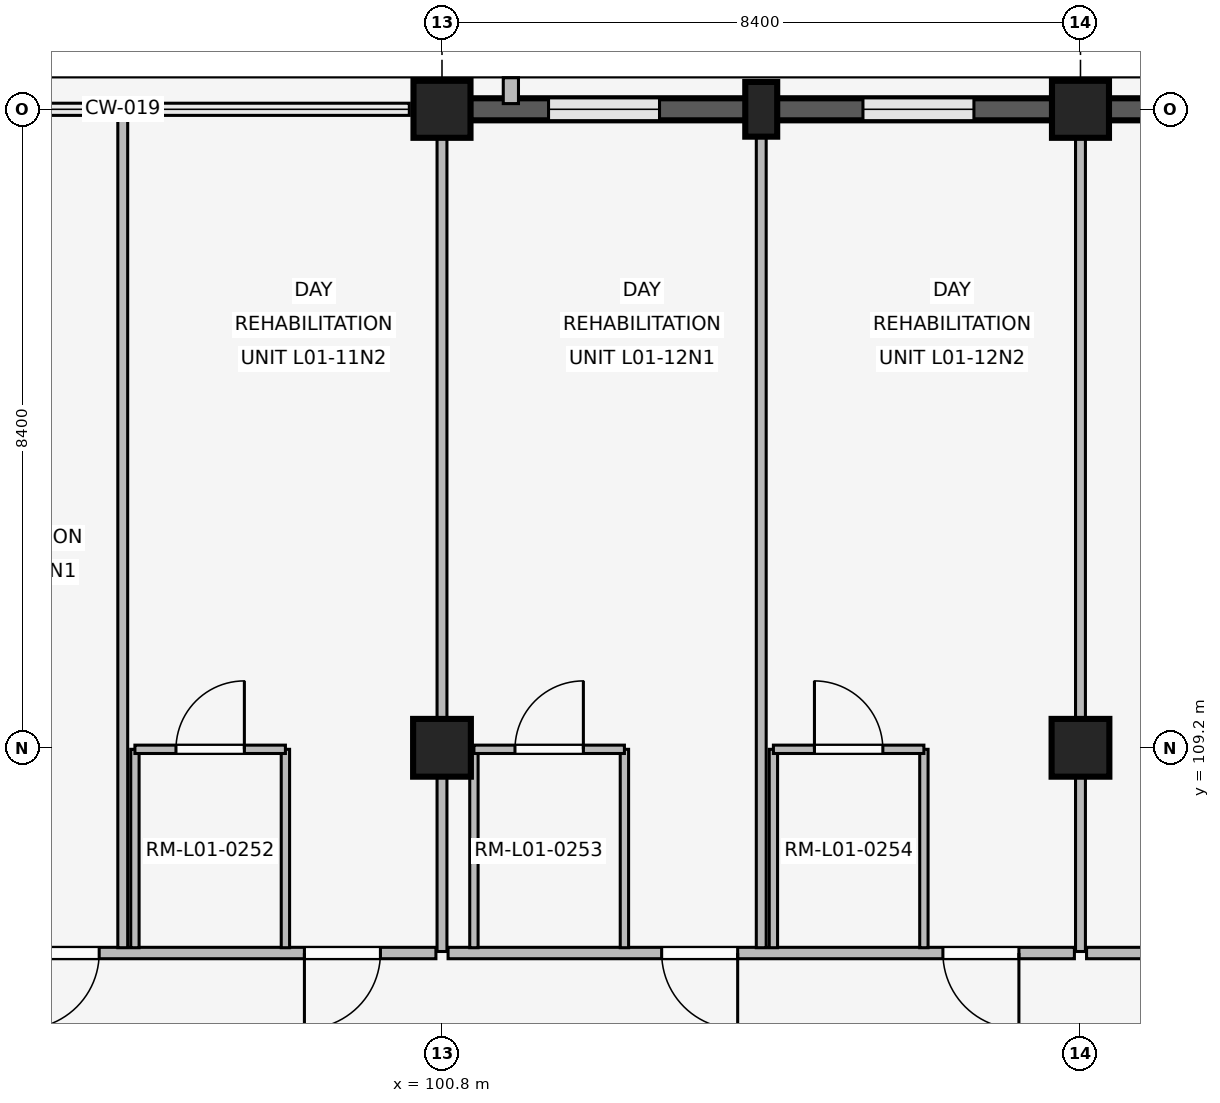
"""IFC4 building model, lengths in metres.
Left out: names, types, materials, properties, quantities, classifications, styles, units other than length and angle.
Written with IfcOpenShell. Run it as: python <this file> out.ifc"""

import sys

from ifc_helpers import new_model, si_unit, direction, frame, frame_2d, origin, origin_2d, place, context, subcontext, project, spatial, rectangle, extrude, element, fill, save


model = new_model("IFC4")
c1 = context("Model", 3, precision=1e-05, world=origin(), true_north=direction((0.0, 1.0)))
c2 = subcontext(c1, "Body", "Model", "MODEL_VIEW")
j1 = project(units=[si_unit("LENGTHUNIT", "METRE"), si_unit("PLANEANGLEUNIT", "RADIAN")], contexts=[c1])
p1 = place(None, origin())
s1 = spatial("IfcSite", under=j1, at=p1, CompositionType="ELEMENT")
p2 = place(p1, origin())
s2 = spatial("IfcBuilding", under=s1, at=p2, CompositionType="ELEMENT")
p3 = place(p2, frame((0.0, 0.0, 4.8)))
s3 = spatial("IfcBuildingStorey", under=s2, at=p3, CompositionType="ELEMENT", Elevation=4.8)
p4 = place(p3, frame((100.8, 109.2, 0.0), z_axis=(0.0, 0.0, 1.0), x_axis=(1.0, 0.0, 0.0)))
e1 = element("IfcColumn", 1, at=p4, inside=s3, PredefinedType="COLUMN", context=c2, shape_type="SweptSolid", body=[
    extrude(rectangle(XDim=0.76, YDim=0.76, at=origin_2d()), origin(), (0.0, 0.0, 1.0), 3.3),
])
p5 = place(p3, frame((100.8, 117.6, 0.0), z_axis=(0.0, 0.0, 1.0), x_axis=(1.0, 0.0, 0.0)))
e2 = element("IfcColumn", 2, at=p5, inside=s3, PredefinedType="COLUMN", context=c2, shape_type="SweptSolid", body=[
    extrude(rectangle(XDim=0.75, YDim=0.75, at=origin_2d()), origin(), (0.0, 0.0, 1.0), 3.3),
])
p6 = place(p3, frame((109.2, 109.2, 0.0), z_axis=(0.0, 0.0, 1.0), x_axis=(1.0, 0.0, 0.0)))
e3 = element("IfcColumn", 3, at=p6, inside=s3, PredefinedType="COLUMN", context=c2, shape_type="SweptSolid", body=[
    extrude(rectangle(XDim=0.76, YDim=0.76, at=origin_2d()), origin(), (0.0, 0.0, 1.0), 3.3),
])
p7 = place(p3, frame((109.2, 117.6, 0.0), z_axis=(0.0, 0.0, 1.0), x_axis=(1.0, 0.0, 0.0)))
e4 = element("IfcColumn", 4, at=p7, inside=s3, PredefinedType="COLUMN", context=c2, shape_type="SweptSolid", body=[
    extrude(rectangle(XDim=0.75, YDim=0.75, at=origin_2d()), origin(), (0.0, 0.0, 1.0), 3.3),
])
p8 = place(p3, frame((105.0, 117.6, 0.0), z_axis=(0.0, 0.0, 1.0), x_axis=(1.0, 0.0, 0.0)))
e5 = element("IfcColumn", 5, at=p8, inside=s3, PredefinedType="PILASTER", context=c2, shape_type="SweptSolid", body=[
    extrude(rectangle(XDim=0.42, YDim=0.72, at=origin_2d()), origin(), (0.0, 0.0, 1.0), 3.3),
])
p9 = place(p3, frame((101.17, 117.6, 0.0), z_axis=(0.0, 0.0, 1.0), x_axis=(1.0, 0.0, 0.0)))
e6 = element("IfcWall", 6, at=p9, inside=s3, PredefinedType="SOLIDWALL", context=c2, shape_type="SweptSolid", body=[
    extrude(rectangle(XDim=7.66, YDim=0.29, at=frame_2d((3.83, 0.0))), origin(), (0.0, 0.0, 1.0), 2.42),
])
p10 = place(p9, frame((1.032, 0.0, 0.85)))
e7 = element("IfcOpeningElement", 7, at=p10, cuts=e6, PredefinedType="OPENING", context=c2, shape_type="SweptSolid", body=[
    extrude(rectangle(XDim=1.46, YDim=0.85, at=frame_2d((0.73, 0.425))), frame((0.0, 0.155, 0.0), z_axis=(0.0, -1.0, 0.0), x_axis=(1.0, 0.0, 0.0)), (0.0, 0.0, 1.0), 0.31),
])
p11 = place(p9, frame((5.168, 0.0, 0.85)))
e8 = element("IfcOpeningElement", 8, at=p11, cuts=e6, PredefinedType="OPENING", context=c2, shape_type="SweptSolid", body=[
    extrude(rectangle(XDim=1.46, YDim=0.85, at=frame_2d((0.73, 0.425))), frame((0.0, 0.155, 0.0), z_axis=(0.0, -1.0, 0.0), x_axis=(1.0, 0.0, 0.0)), (0.0, 0.0, 1.0), 0.31),
])
p12 = place(p3, frame((101.706, 117.675, 0.0), z_axis=(0.0, 0.0, 1.0), x_axis=(0.0, 1.0, 0.0)))
e9 = element("IfcWall", 9, at=p12, inside=s3, PredefinedType="ELEMENTEDWALL", context=c2, shape_type="SweptSolid", body=[
    extrude(rectangle(XDim=0.34, YDim=0.2, at=frame_2d((0.17, 0.0))), origin(), (0.0, 0.0, 1.0), 2.4),
])
p13 = place(p3, frame((109.57, 117.6, 0.0), z_axis=(0.0, 0.0, 1.0), x_axis=(1.0, 0.0, 0.0)))
e10 = element("IfcWall", 10, at=p13, inside=s3, PredefinedType="SOLIDWALL", context=c2, shape_type="SweptSolid", body=[
    extrude(rectangle(XDim=7.66, YDim=0.29, at=frame_2d((3.83, 0.0))), origin(), (0.0, 0.0, 1.0), 2.42),
])
p14 = place(p13, frame((0.952, 0.0, 0.85)))
e11 = element("IfcOpeningElement", 11, at=p14, cuts=e10, PredefinedType="OPENING", context=c2, shape_type="SweptSolid", body=[
    extrude(rectangle(XDim=1.62, YDim=0.95, at=frame_2d((0.81, 0.475))), frame((0.0, 0.155, 0.0), z_axis=(0.0, -1.0, 0.0), x_axis=(1.0, 0.0, 0.0)), (0.0, 0.0, 1.0), 0.31),
])
p15 = place(p13, frame((5.088, 0.0, 0.85)))
e12 = element("IfcOpeningElement", 12, at=p15, cuts=e10, PredefinedType="OPENING", context=c2, shape_type="SweptSolid", body=[
    extrude(rectangle(XDim=1.62, YDim=0.95, at=frame_2d((0.81, 0.475))), frame((0.0, 0.155, 0.0), z_axis=(0.0, -1.0, 0.0), x_axis=(1.0, 0.0, 0.0)), (0.0, 0.0, 1.0), 0.31),
])
p16 = place(p3, frame((100.72, 106.5, 0.0), z_axis=(0.0, 0.0, 1.0), x_axis=(-1.0, 0.0, 0.0)))
e13 = element("IfcWall", 13, at=p16, inside=s3, PredefinedType="PARTITIONING", context=c2, shape_type="SweptSolid", body=[
    extrude(rectangle(XDim=7.96, YDim=0.15, at=frame_2d((3.98, 0.0))), origin(), (0.0, 0.0, 1.0), 2.4),
])
p17 = place(p16, frame((0.73, 0.0, 0.0)))
e14 = element("IfcOpeningElement", 14, at=p17, cuts=e13, PredefinedType="OPENING", context=c2, shape_type="SweptSolid", body=[
    extrude(rectangle(XDim=1.0, YDim=2.15, at=frame_2d((0.5, 1.075))), frame((0.0, 0.085, 0.0), z_axis=(0.0, -1.0, 0.0), x_axis=(1.0, 0.0, 0.0)), (0.0, 0.0, 1.0), 0.17),
])
p18 = place(p16, frame((4.43, 0.0, 0.0)))
e15 = element("IfcOpeningElement", 15, at=p18, cuts=e13, PredefinedType="OPENING", context=c2, shape_type="SweptSolid", body=[
    extrude(rectangle(XDim=1.0, YDim=2.15, at=frame_2d((0.5, 1.075))), frame((0.0, 0.085, 0.0), z_axis=(0.0, -1.0, 0.0), x_axis=(1.0, 0.0, 0.0)), (0.0, 0.0, 1.0), 0.17),
])
p19 = place(p3, frame((96.6, 106.57, 0.0), z_axis=(0.0, 0.0, 1.0), x_axis=(0.0, 1.0, 0.0)))
e16 = element("IfcWall", 16, at=p19, inside=s3, PredefinedType="PARTITIONING", context=c2, shape_type="SweptSolid", body=[
    extrude(rectangle(XDim=10.93, YDim=0.13, at=frame_2d((5.465, 0.0))), origin(), (0.0, 0.0, 1.0), 2.4),
])
for number, where, z_axis, x_axis in (
    (17, (96.76, 106.57, 0.0), (0.0, 0.0, 1.0), (0.0, 1.0, 0.0)),
    (18, (98.74, 106.57, 0.0), (0.0, 0.0, 1.0), (0.0, 1.0, 0.0)),
):
    element("IfcWall", number, at=place(p3, frame(where, z_axis=z_axis, x_axis=x_axis)), inside=s3, PredefinedType="PARTITIONING", context=c2, shape_type="SweptSolid", body=[
        extrude(rectangle(XDim=2.61, YDim=0.11, at=frame_2d((1.305, 0.0))), origin(), (0.0, 0.0, 1.0), 2.4),
    ])
p20 = place(p3, frame((96.76, 109.18, 0.0), z_axis=(0.0, 0.0, 1.0), x_axis=(1.0, 0.0, 0.0)))
e19 = element("IfcWall", 19, at=p20, inside=s3, PredefinedType="PARTITIONING", context=c2, shape_type="SweptSolid", body=[
    extrude(rectangle(XDim=1.98, YDim=0.11, at=frame_2d((0.99, 0.0))), origin(), (0.0, 0.0, 1.0), 2.4),
])
p21 = place(p20, frame((0.54, 0.0, 0.0)))
e20 = element("IfcOpeningElement", 20, at=p21, cuts=e19, PredefinedType="OPENING", context=c2, shape_type="SweptSolid", body=[
    extrude(rectangle(XDim=0.9, YDim=2.1, at=frame_2d((0.45, 1.05))), frame((0.0, 0.065, 0.0), z_axis=(0.0, -1.0, 0.0), x_axis=(1.0, 0.0, 0.0)), (0.0, 0.0, 1.0), 0.13),
])
p22 = place(p3, frame((100.8, 106.52, 0.0), z_axis=(0.0, 0.0, 1.0), x_axis=(0.0, 1.0, 0.0)))
e21 = element("IfcWall", 21, at=p22, inside=s3, PredefinedType="PARTITIONING", context=c2, shape_type="SweptSolid", body=[
    extrude(rectangle(XDim=10.94, YDim=0.13, at=frame_2d((5.47, 0.0))), origin(), (0.0, 0.0, 1.0), 2.4),
])
p23 = place(p3, frame((109.12, 106.5, 0.0), z_axis=(0.0, 0.0, 1.0), x_axis=(-1.0, 0.0, 0.0)))
e22 = element("IfcWall", 22, at=p23, inside=s3, PredefinedType="PARTITIONING", context=c2, shape_type="SweptSolid", body=[
    extrude(rectangle(XDim=8.24, YDim=0.15, at=frame_2d((4.12, 0.0))), origin(), (0.0, 0.0, 1.0), 2.4),
])
p24 = place(p23, frame((0.73, 0.0, 0.0)))
e23 = element("IfcOpeningElement", 23, at=p24, cuts=e22, PredefinedType="OPENING", context=c2, shape_type="SweptSolid", body=[
    extrude(rectangle(XDim=1.0, YDim=2.15, at=frame_2d((0.5, 1.075))), frame((0.0, 0.085, 0.0), z_axis=(0.0, -1.0, 0.0), x_axis=(1.0, 0.0, 0.0)), (0.0, 0.0, 1.0), 0.17),
])
p25 = place(p23, frame((4.43, 0.0, 0.0)))
e24 = element("IfcOpeningElement", 24, at=p25, cuts=e22, PredefinedType="OPENING", context=c2, shape_type="SweptSolid", body=[
    extrude(rectangle(XDim=1.0, YDim=2.15, at=frame_2d((0.5, 1.075))), frame((0.0, 0.085, 0.0), z_axis=(0.0, -1.0, 0.0), x_axis=(1.0, 0.0, 0.0)), (0.0, 0.0, 1.0), 0.17),
])
p26 = place(p3, frame((105.0, 106.57, 0.0), z_axis=(0.0, 0.0, 1.0), x_axis=(0.0, 1.0, 0.0)))
e25 = element("IfcWall", 25, at=p26, inside=s3, PredefinedType="PARTITIONING", context=c2, shape_type="SweptSolid", body=[
    extrude(rectangle(XDim=10.93, YDim=0.13, at=frame_2d((5.465, 0.0))), origin(), (0.0, 0.0, 1.0), 2.4),
])
for number, where, z_axis, x_axis in (
    (26, (101.22, 106.57, 0.0), (0.0, 0.0, 1.0), (0.0, 1.0, 0.0)),
    (27, (103.2, 106.57, 0.0), (0.0, 0.0, 1.0), (0.0, 1.0, 0.0)),
):
    element("IfcWall", number, at=place(p3, frame(where, z_axis=z_axis, x_axis=x_axis)), inside=s3, PredefinedType="PARTITIONING", context=c2, shape_type="SweptSolid", body=[
        extrude(rectangle(XDim=2.61, YDim=0.11, at=frame_2d((1.305, 0.0))), origin(), (0.0, 0.0, 1.0), 2.4),
    ])
p27 = place(p3, frame((101.22, 109.18, 0.0), z_axis=(0.0, 0.0, 1.0), x_axis=(1.0, 0.0, 0.0)))
e28 = element("IfcWall", 28, at=p27, inside=s3, PredefinedType="PARTITIONING", context=c2, shape_type="SweptSolid", body=[
    extrude(rectangle(XDim=1.98, YDim=0.11, at=frame_2d((0.99, 0.0))), origin(), (0.0, 0.0, 1.0), 2.4),
])
p28 = place(p27, frame((0.54, 0.0, 0.0)))
e29 = element("IfcOpeningElement", 29, at=p28, cuts=e28, PredefinedType="OPENING", context=c2, shape_type="SweptSolid", body=[
    extrude(rectangle(XDim=0.9, YDim=2.1, at=frame_2d((0.45, 1.05))), frame((0.0, 0.065, 0.0), z_axis=(0.0, -1.0, 0.0), x_axis=(1.0, 0.0, 0.0)), (0.0, 0.0, 1.0), 0.13),
])
for number, where, z_axis, x_axis in (
    (30, (105.16, 106.57, 0.0), (0.0, 0.0, 1.0), (0.0, 1.0, 0.0)),
    (31, (107.14, 106.57, 0.0), (0.0, 0.0, 1.0), (0.0, 1.0, 0.0)),
):
    element("IfcWall", number, at=place(p3, frame(where, z_axis=z_axis, x_axis=x_axis)), inside=s3, PredefinedType="PARTITIONING", context=c2, shape_type="SweptSolid", body=[
        extrude(rectangle(XDim=2.61, YDim=0.11, at=frame_2d((1.305, 0.0))), origin(), (0.0, 0.0, 1.0), 2.4),
    ])
p29 = place(p3, frame((105.16, 109.18, 0.0), z_axis=(0.0, 0.0, 1.0), x_axis=(1.0, 0.0, 0.0)))
e32 = element("IfcWall", 32, at=p29, inside=s3, PredefinedType="PARTITIONING", context=c2, shape_type="SweptSolid", body=[
    extrude(rectangle(XDim=1.98, YDim=0.11, at=frame_2d((0.99, 0.0))), origin(), (0.0, 0.0, 1.0), 2.4),
])
p30 = place(p29, frame((0.54, 0.0, 0.0)))
e33 = element("IfcOpeningElement", 33, at=p30, cuts=e32, PredefinedType="OPENING", context=c2, shape_type="SweptSolid", body=[
    extrude(rectangle(XDim=0.9, YDim=2.1, at=frame_2d((0.45, 1.05))), frame((0.0, 0.065, 0.0), z_axis=(0.0, -1.0, 0.0), x_axis=(1.0, 0.0, 0.0)), (0.0, 0.0, 1.0), 0.13),
])
p31 = place(p3, frame((109.2, 106.52, 0.0), z_axis=(0.0, 0.0, 1.0), x_axis=(0.0, 1.0, 0.0)))
e34 = element("IfcWall", 34, at=p31, inside=s3, PredefinedType="PARTITIONING", context=c2, shape_type="SweptSolid", body=[
    extrude(rectangle(XDim=10.94, YDim=0.13, at=frame_2d((5.47, 0.0))), origin(), (0.0, 0.0, 1.0), 2.4),
])
p32 = place(p3, frame((117.52, 106.5, 0.0), z_axis=(0.0, 0.0, 1.0), x_axis=(-1.0, 0.0, 0.0)))
e35 = element("IfcWall", 35, at=p32, inside=s3, PredefinedType="PARTITIONING", context=c2, shape_type="SweptSolid", body=[
    extrude(rectangle(XDim=8.24, YDim=0.15, at=frame_2d((4.12, 0.0))), origin(), (0.0, 0.0, 1.0), 2.4),
])
p33 = place(p32, frame((3.57, 0.0, 0.0)))
e36 = element("IfcOpeningElement", 36, at=p33, cuts=e35, PredefinedType="OPENING", context=c2, shape_type="SweptSolid", body=[
    extrude(rectangle(XDim=1.1, YDim=2.2, at=frame_2d((0.55, 1.1))), frame((0.0, 0.085, 0.0), z_axis=(0.0, -1.0, 0.0), x_axis=(1.0, 0.0, 0.0)), (0.0, 0.0, 1.0), 0.17),
])
p34 = place(p10, origin())
e37 = element("IfcWindow", 37, at=p34, inside=s3, PartitioningType="SINGLE_PANEL", PredefinedType="WINDOW", context=c2, shape_type="SweptSolid", body=[
    extrude(rectangle(XDim=1.46, YDim=0.85, at=frame_2d((0.73, 0.425))), frame((0.0, 0.03, 0.0), z_axis=(0.0, -1.0, 0.0), x_axis=(1.0, 0.0, 0.0)), (0.0, 0.0, 1.0), 0.06),
])
fill(e7, e37)
p35 = place(p11, origin())
e38 = element("IfcWindow", 38, at=p35, inside=s3, PartitioningType="SINGLE_PANEL", PredefinedType="WINDOW", context=c2, shape_type="SweptSolid", body=[
    extrude(rectangle(XDim=1.46, YDim=0.85, at=frame_2d((0.73, 0.425))), frame((0.0, 0.03, 0.0), z_axis=(0.0, -1.0, 0.0), x_axis=(1.0, 0.0, 0.0)), (0.0, 0.0, 1.0), 0.06),
])
fill(e8, e38)
p36 = place(p17, origin())
e39 = element("IfcDoor", 39, at=p36, inside=s3, OperationType="SINGLE_SWING_RIGHT", PredefinedType="DOOR", context=c2, shape_type="SweptSolid", body=[
    extrude(rectangle(XDim=1.0, YDim=2.15, at=frame_2d((0.5, 1.075))), frame((0.0, 0.025, 0.0), z_axis=(0.0, -1.0, 0.0), x_axis=(1.0, 0.0, 0.0)), (0.0, 0.0, 1.0), 0.05),
])
fill(e14, e39)
p37 = place(p18, origin())
e40 = element("IfcDoor", 40, at=p37, inside=s3, OperationType="SINGLE_SWING_RIGHT", PredefinedType="DOOR", context=c2, shape_type="SweptSolid", body=[
    extrude(rectangle(XDim=1.0, YDim=2.15, at=frame_2d((0.5, 1.075))), frame((0.0, 0.025, 0.0), z_axis=(0.0, -1.0, 0.0), x_axis=(1.0, 0.0, 0.0)), (0.0, 0.0, 1.0), 0.05),
])
fill(e15, e40)
p38 = place(p21, origin())
e41 = element("IfcDoor", 41, at=p38, inside=s3, OperationType="SINGLE_SWING_RIGHT", PredefinedType="DOOR", context=c2, shape_type="SweptSolid", body=[
    extrude(rectangle(XDim=0.9, YDim=2.1, at=frame_2d((0.45, 1.05))), frame((0.0, 0.025, 0.0), z_axis=(0.0, -1.0, 0.0), x_axis=(1.0, 0.0, 0.0)), (0.0, 0.0, 1.0), 0.05),
])
fill(e20, e41)
p39 = place(p24, origin())
e42 = element("IfcDoor", 42, at=p39, inside=s3, OperationType="SINGLE_SWING_LEFT", PredefinedType="DOOR", context=c2, shape_type="SweptSolid", body=[
    extrude(rectangle(XDim=1.0, YDim=2.15, at=frame_2d((0.5, 1.075))), frame((0.0, 0.025, 0.0), z_axis=(0.0, -1.0, 0.0), x_axis=(1.0, 0.0, 0.0)), (0.0, 0.0, 1.0), 0.05),
])
fill(e23, e42)
p40 = place(p25, origin())
e43 = element("IfcDoor", 43, at=p40, inside=s3, OperationType="SINGLE_SWING_LEFT", PredefinedType="DOOR", context=c2, shape_type="SweptSolid", body=[
    extrude(rectangle(XDim=1.0, YDim=2.15, at=frame_2d((0.5, 1.075))), frame((0.0, 0.025, 0.0), z_axis=(0.0, -1.0, 0.0), x_axis=(1.0, 0.0, 0.0)), (0.0, 0.0, 1.0), 0.05),
])
fill(e24, e43)
p41 = place(p28, origin())
e44 = element("IfcDoor", 44, at=p41, inside=s3, OperationType="SINGLE_SWING_RIGHT", PredefinedType="DOOR", context=c2, shape_type="SweptSolid", body=[
    extrude(rectangle(XDim=0.9, YDim=2.1, at=frame_2d((0.45, 1.05))), frame((0.0, 0.025, 0.0), z_axis=(0.0, -1.0, 0.0), x_axis=(1.0, 0.0, 0.0)), (0.0, 0.0, 1.0), 0.05),
])
fill(e29, e44)
p42 = place(p30, origin())
e45 = element("IfcDoor", 45, at=p42, inside=s3, OperationType="SINGLE_SWING_LEFT", PredefinedType="DOOR", context=c2, shape_type="SweptSolid", body=[
    extrude(rectangle(XDim=0.9, YDim=2.1, at=frame_2d((0.45, 1.05))), frame((0.0, 0.025, 0.0), z_axis=(0.0, -1.0, 0.0), x_axis=(1.0, 0.0, 0.0)), (0.0, 0.0, 1.0), 0.05),
])
fill(e33, e45)
save(model, sys.argv[1])
